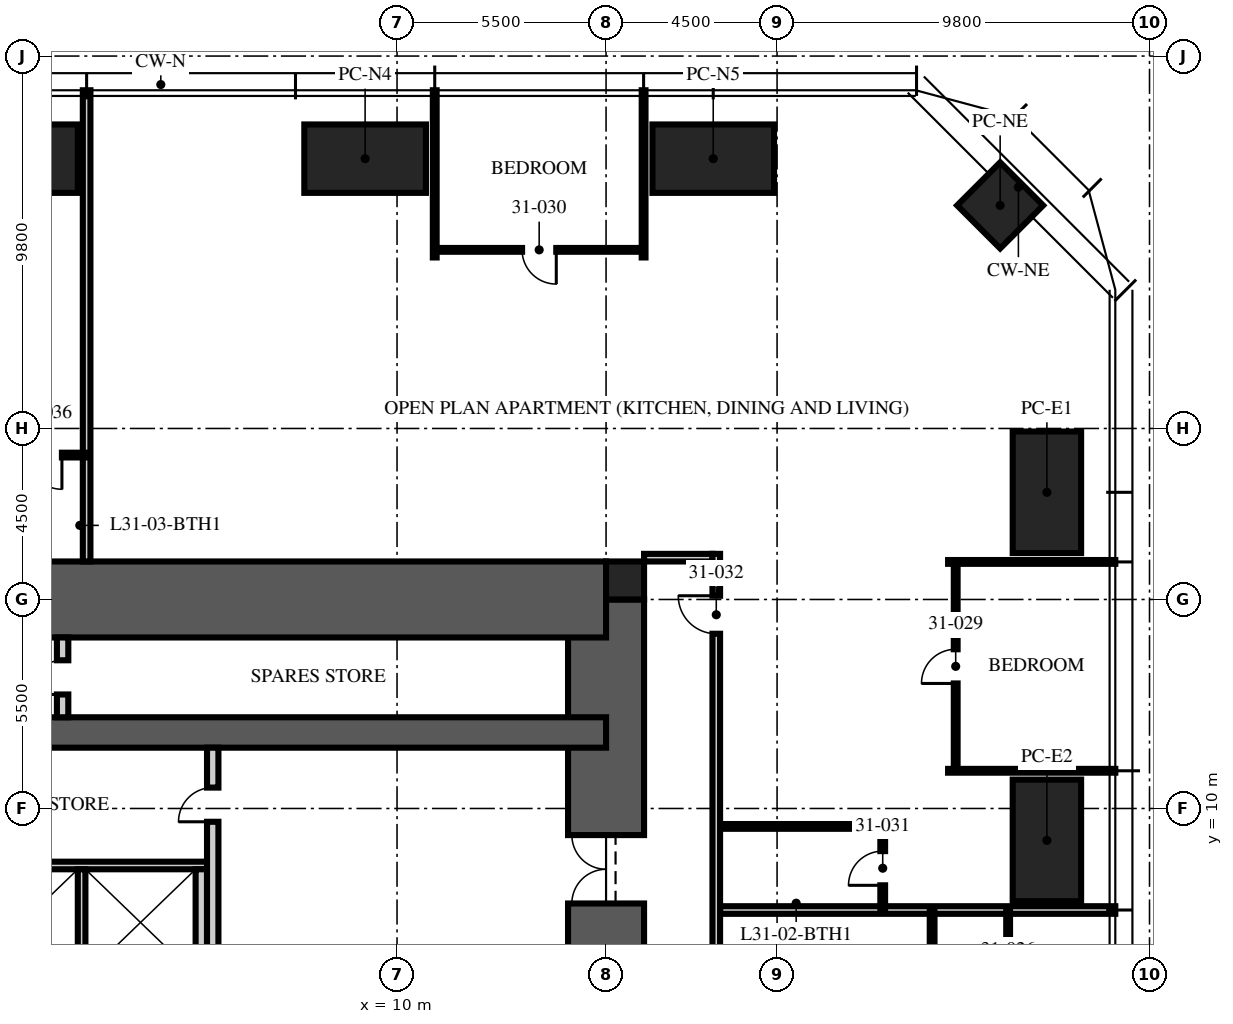
"""IFC4 building model, lengths in metres.
Left out: names, types, materials, properties, quantities, classifications, styles, units other than length and angle.
Written with IfcOpenShell. Run it as: python <this file> out.ifc"""

import sys

from ifc_helpers import new_model, si_unit, direction, frame, frame_2d, origin, origin_2d, place, context, subcontext, project, spatial, rectangle, extrude, element, fill, save


model = new_model("IFC4")
c1 = context("Model", 3, precision=1e-05, world=origin(), true_north=direction((0.0, 1.0)))
c2 = subcontext(c1, "Body", "Model", "MODEL_VIEW")
j1 = project(units=[si_unit("LENGTHUNIT", "METRE"), si_unit("PLANEANGLEUNIT", "RADIAN")], contexts=[c1])
p1 = place(None, origin())
s1 = spatial("IfcSite", under=j1, at=p1, CompositionType="ELEMENT")
p2 = place(p1, origin())
s2 = spatial("IfcBuilding", under=s1, at=p2, CompositionType="ELEMENT")
p3 = place(p2, frame((0.0, 0.0, 126.0)))
s3 = spatial("IfcBuildingStorey", under=s2, at=p3, CompositionType="ELEMENT", Elevation=126.0)
p4 = place(p3, frame((15.5, -15.5, -0.25), z_axis=(0.0, 0.0, 1.0), x_axis=(0.0, 1.0, 0.0)))
e1 = element("IfcWall", 1, at=p4, inside=s3, PredefinedType="SHEAR", context=c2, shape_type="SweptSolid", body=[
    extrude(rectangle(XDim=31.0, YDim=2.0, at=frame_2d((15.5, 0.0))), origin(), (0.0, 0.0, 1.0), 3.75),
])
p5 = place(p4, frame((6.5, 0.0, 0.25)))
e2 = element("IfcOpeningElement", 2, at=p5, cuts=e1, PredefinedType="OPENING", context=c2, shape_type="SweptSolid", body=[
    extrude(rectangle(XDim=1.2, YDim=2.1, at=frame_2d((0.6, 1.05))), frame((0.0, 1.01, 0.0), z_axis=(0.0, -1.0, 0.0), x_axis=(1.0, 0.0, 0.0)), (0.0, 0.0, 1.0), 2.02),
])
p6 = place(p4, frame((23.0, 0.0, 0.25)))
e3 = element("IfcOpeningElement", 3, at=p6, cuts=e1, PredefinedType="OPENING", context=c2, shape_type="SweptSolid", body=[
    extrude(rectangle(XDim=1.8, YDim=2.1, at=frame_2d((0.9, 1.05))), frame((0.0, 1.01, 0.0), z_axis=(0.0, -1.0, 0.0), x_axis=(1.0, 0.0, 0.0)), (0.0, 0.0, 1.0), 2.02),
])
p7 = place(p3, frame((-15.5, 15.5, -0.25), z_axis=(0.0, 0.0, 1.0), x_axis=(1.0, 0.0, 0.0)))
e4 = element("IfcWall", 4, at=p7, inside=s3, PredefinedType="SHEAR", context=c2, shape_type="SweptSolid", body=[
    extrude(rectangle(XDim=31.0, YDim=2.0, at=frame_2d((15.5, 0.0))), origin(), (0.0, 0.0, 1.0), 3.75),
])
p8 = place(p7, frame((5.0, 0.0, 0.25)))
e5 = element("IfcOpeningElement", 5, at=p8, cuts=e4, PredefinedType="OPENING", context=c2, shape_type="SweptSolid", body=[
    extrude(rectangle(XDim=1.0, YDim=2.1, at=frame_2d((0.5, 1.05))), frame((0.0, 1.01, 0.0), z_axis=(0.0, -1.0, 0.0), x_axis=(1.0, 0.0, 0.0)), (0.0, 0.0, 1.0), 2.02),
])
p9 = place(p3, frame((-15.5, 12.0, -0.25), z_axis=(0.0, 0.0, 1.0), x_axis=(1.0, 0.0, 0.0)))
e6 = element("IfcWall", 6, at=p9, inside=s3, PredefinedType="SHEAR", context=c2, shape_type="SweptSolid", body=[
    extrude(rectangle(XDim=31.0, YDim=0.8, at=frame_2d((15.5, 0.0))), origin(), (0.0, 0.0, 1.0), 3.75),
])
p10 = place(p3, frame((16.0, 16.0, -0.25), z_axis=(0.0, 0.0, 1.0), x_axis=(1.0, 0.0, 0.0)))
e7 = element("IfcColumn", 7, at=p10, inside=s3, PredefinedType="COLUMN", context=c2, shape_type="SweptSolid", body=[
    extrude(rectangle(XDim=1.0, YDim=1.0, at=origin_2d()), origin(), (0.0, 0.0, 1.0), 3.75),
])
for number, where, z_axis, x_axis in (
    (8, (0.0, 27.1, 0.0), (0.0, 0.0, 1.0), (1.0, 0.0, 0.0)),
    (9, (9.16, 27.1, 0.0), (0.0, 0.0, 1.0), (1.0, 0.0, 0.0)),
    (10, (18.32, 27.1, 0.0), (0.0, 0.0, 1.0), (1.0, 0.0, 0.0)),
    (11, (27.1, 18.32, 0.0), (0.0, 0.0, 1.0), (0.0, 1.0, 0.0)),
    (12, (27.1, 9.16, 0.0), (0.0, 0.0, 1.0), (0.0, 1.0, 0.0)),
):
    element("IfcColumn", number, at=place(p3, frame(where, z_axis=z_axis, x_axis=x_axis)), inside=s3, PredefinedType="COLUMN", context=c2, shape_type="SweptSolid", body=[
        extrude(rectangle(XDim=3.2, YDim=1.8, at=origin_2d()), origin(), (0.0, 0.0, 1.0), 3.75),
    ])
p11 = place(p3, frame((25.87, 25.87, 0.0), z_axis=(0.0, 0.0, 1.0), x_axis=(0.707106781187, -0.707106781187, 0.0)))
e13 = element("IfcColumn", 13, at=p11, inside=s3, PredefinedType="COLUMN", context=c2, shape_type="SweptSolid", body=[
    extrude(rectangle(XDim=1.6, YDim=1.6, at=origin_2d()), origin(), (0.0, 0.0, 1.0), 3.75),
])
p12 = place(p3, frame((-4.7, 8.5, 0.0), z_axis=(0.0, 0.0, 1.0), x_axis=(1.0, 0.0, 0.0)))
e14 = element("IfcWall", 14, at=p12, inside=s3, PredefinedType="PARTITIONING", context=c2, shape_type="SweptSolid", body=[
    extrude(rectangle(XDim=9.7, YDim=0.2, at=frame_2d((4.85, 0.0))), origin(), (0.0, 0.0, 1.0), 3.5),
])
p13 = place(p3, frame((4.85, 5.6, 0.0), z_axis=(0.0, 0.0, 1.0), x_axis=(0.0, 1.0, 0.0)))
e15 = element("IfcWall", 15, at=p13, inside=s3, PredefinedType="PARTITIONING", context=c2, shape_type="SweptSolid", body=[
    extrude(rectangle(XDim=2.8, YDim=0.3, at=frame_2d((1.4, 0.0))), origin(), (0.0, 0.0, 1.0), 3.5),
])
p14 = place(p3, frame((1.7, 5.6, 0.0), z_axis=(0.0, 0.0, 1.0), x_axis=(0.0, 1.0, 0.0)))
e16 = element("IfcWall", 16, at=p14, inside=s3, PredefinedType="PARTITIONING", context=c2, shape_type="SweptSolid", body=[
    extrude(rectangle(XDim=2.8, YDim=0.2, at=frame_2d((1.4, 0.0))), origin(), (0.0, 0.0, 1.0), 3.5),
])
p15 = place(p3, frame((5.15, 5.3, 0.0), z_axis=(0.0, 0.0, 1.0), x_axis=(0.0, 1.0, 0.0)))
e17 = element("IfcWall", 17, at=p15, inside=s3, PredefinedType="PARTITIONING", context=c2, shape_type="SweptSolid", body=[
    extrude(rectangle(XDim=6.3, YDim=0.3, at=frame_2d((3.15, 0.0))), origin(), (0.0, 0.0, 1.0), 3.5),
])
p16 = place(p15, frame((4.35, 0.0, 0.0)))
e18 = element("IfcOpeningElement", 18, at=p16, cuts=e17, PredefinedType="OPENING", context=c2, shape_type="SweptSolid", body=[
    extrude(rectangle(XDim=0.9, YDim=2.1, at=frame_2d((0.45, 1.05))), frame((0.0, 0.16, 0.0), z_axis=(0.0, -1.0, 0.0), x_axis=(1.0, 0.0, 0.0)), (0.0, 0.0, 1.0), 0.32),
])
p17 = place(p3, frame((1.2, 12.4, 0.0), z_axis=(0.0, 0.0, 1.0), x_axis=(0.0, 1.0, 0.0)))
e19 = element("IfcWall", 19, at=p17, inside=s3, PredefinedType="PARTITIONING", context=c2, shape_type="SweptSolid", body=[
    extrude(rectangle(XDim=2.1, YDim=0.3, at=frame_2d((1.05, 0.0))), origin(), (0.0, 0.0, 1.0), 3.5),
])
p18 = place(p17, frame((0.6, 0.0, 0.0)))
e20 = element("IfcOpeningElement", 20, at=p18, cuts=e19, PredefinedType="OPENING", context=c2, shape_type="SweptSolid", body=[
    extrude(rectangle(XDim=0.9, YDim=2.1, at=frame_2d((0.45, 1.05))), frame((0.0, 0.16, 0.0), z_axis=(0.0, -1.0, 0.0), x_axis=(1.0, 0.0, 0.0)), (0.0, 0.0, 1.0), 0.32),
])
p19 = place(p3, frame((16.5, 16.6, 0.0), z_axis=(0.0, 0.0, 1.0), x_axis=(1.0, 0.0, 0.0)))
e21 = element("IfcWall", 21, at=p19, inside=s3, PredefinedType="PARTITIONING", context=c2, shape_type="SweptSolid", body=[
    extrude(rectangle(XDim=1.8, YDim=0.2, at=frame_2d((0.9, 0.0))), origin(), (0.0, 0.0, 1.0), 2.3),
])
p20 = place(p3, frame((18.5, 7.328, 0.0), z_axis=(0.0, 0.0, 1.0), x_axis=(1.0, 0.0, 0.0)))
e22 = element("IfcWall", 22, at=p20, inside=s3, PredefinedType="PARTITIONING", context=c2, shape_type="SweptSolid", body=[
    extrude(rectangle(XDim=10.4, YDim=0.2, at=frame_2d((5.2, 0.0))), origin(), (0.0, 0.0, 1.0), 2.81),
])
for number, where, z_axis, x_axis in (
    (23, (24.5, 10.992, 0.0), (0.0, 0.0, 1.0), (1.0, 0.0, 0.0)),
    (24, (24.5, 16.488, 0.0), (0.0, 0.0, 1.0), (1.0, 0.0, 0.0)),
    (25, (16.488, 24.5, 0.0), (0.0, 0.0, 1.0), (0.0, 1.0, 0.0)),
    (26, (10.992, 24.5, 0.0), (0.0, 0.0, 1.0), (0.0, 1.0, 0.0)),
):
    element("IfcWall", number, at=place(p3, frame(where, z_axis=z_axis, x_axis=x_axis)), inside=s3, PredefinedType="PARTITIONING", context=c2, shape_type="SweptSolid", body=[
        extrude(rectangle(XDim=4.4, YDim=0.1, at=frame_2d((2.2, 0.0))), origin(), (0.0, 0.0, 1.0), 2.81),
    ])
p21 = place(p3, frame((1.832, 16.5, 0.0), z_axis=(0.0, 0.0, 1.0), x_axis=(0.0, 1.0, 0.0)))
e27 = element("IfcWall", 27, at=p21, inside=s3, PredefinedType="PARTITIONING", context=c2, shape_type="SweptSolid", body=[
    extrude(rectangle(XDim=12.4, YDim=0.2, at=frame_2d((6.2, 0.0))), origin(), (0.0, 0.0, 1.0), 2.81),
])
p22 = place(p3, frame((26.08, 1.832, 0.0), z_axis=(0.0, 0.0, 1.0), x_axis=(0.0, 1.0, 0.0)))
e28 = element("IfcWall", 28, at=p22, inside=s3, PredefinedType="PARTITIONING", context=c2, shape_type="SweptSolid", body=[
    extrude(rectangle(XDim=5.496, YDim=0.1, at=frame_2d((2.748, 0.0))), origin(), (0.0, 0.0, 1.0), 2.81),
])
p23 = place(p22, frame((0.15, 0.0, 0.0)))
e29 = element("IfcOpeningElement", 29, at=p23, cuts=e28, PredefinedType="OPENING", context=c2, shape_type="SweptSolid", body=[
    extrude(rectangle(XDim=0.9, YDim=2.1, at=frame_2d((0.45, 1.05))), frame((0.0, 0.06, 0.0), z_axis=(0.0, -1.0, 0.0), x_axis=(1.0, 0.0, 0.0)), (0.0, 0.0, 1.0), 0.12),
])
p24 = place(p22, frame((2.898, 0.0, 0.0)))
e30 = element("IfcOpeningElement", 30, at=p24, cuts=e28, PredefinedType="OPENING", context=c2, shape_type="SweptSolid", body=[
    extrude(rectangle(XDim=0.9, YDim=2.1, at=frame_2d((0.45, 1.05))), frame((0.0, 0.06, 0.0), z_axis=(0.0, -1.0, 0.0), x_axis=(1.0, 0.0, 0.0)), (0.0, 0.0, 1.0), 0.12),
])
p25 = place(p3, frame((24.08, 3.032, 0.0), z_axis=(0.0, 0.0, 1.0), x_axis=(0.0, 1.0, 0.0)))
e31 = element("IfcWall", 31, at=p25, inside=s3, PredefinedType="PARTITIONING", context=c2, shape_type="SweptSolid", body=[
    extrude(rectangle(XDim=4.296, YDim=0.125, at=frame_2d((2.148, 0.0))), origin(), (0.0, 0.0, 1.0), 2.81),
])
p26 = place(p3, frame((24.7, 10.992, 0.0), z_axis=(0.0, 0.0, 1.0), x_axis=(0.0, 1.0, 0.0)))
e32 = element("IfcWall", 32, at=p26, inside=s3, PredefinedType="PARTITIONING", context=c2, shape_type="SweptSolid", body=[
    extrude(rectangle(XDim=5.496, YDim=0.1, at=frame_2d((2.748, 0.0))), origin(), (0.0, 0.0, 1.0), 2.81),
])
p27 = place(p26, frame((2.298, 0.0, 0.0)))
e33 = element("IfcOpeningElement", 33, at=p27, cuts=e32, PredefinedType="OPENING", context=c2, shape_type="SweptSolid", body=[
    extrude(rectangle(XDim=0.9, YDim=2.1, at=frame_2d((0.45, 1.05))), frame((0.0, 0.06, 0.0), z_axis=(0.0, -1.0, 0.0), x_axis=(1.0, 0.0, 0.0)), (0.0, 0.0, 1.0), 0.12),
])
p28 = place(p3, frame((16.488, 24.7, 0.0), z_axis=(0.0, 0.0, 1.0), x_axis=(-1.0, 0.0, 0.0)))
e34 = element("IfcWall", 34, at=p28, inside=s3, PredefinedType="PARTITIONING", context=c2, shape_type="SweptSolid", body=[
    extrude(rectangle(XDim=5.496, YDim=0.1, at=frame_2d((2.748, 0.0))), origin(), (0.0, 0.0, 1.0), 2.81),
])
p29 = place(p28, frame((2.298, 0.0, 0.0)))
e35 = element("IfcOpeningElement", 35, at=p29, cuts=e34, PredefinedType="OPENING", context=c2, shape_type="SweptSolid", body=[
    extrude(rectangle(XDim=0.9, YDim=2.1, at=frame_2d((0.45, 1.05))), frame((0.0, 0.06, 0.0), z_axis=(0.0, -1.0, 0.0), x_axis=(1.0, 0.0, 0.0)), (0.0, 0.0, 1.0), 0.12),
])
p30 = place(p3, frame((22.78, 7.328, 0.0), z_axis=(0.0, 0.0, 1.0), x_axis=(0.0, 1.0, 0.0)))
e36 = element("IfcWall", 36, at=p30, inside=s3, PredefinedType="PARTITIONING", context=c2, shape_type="SweptSolid", body=[
    extrude(rectangle(XDim=2.2, YDim=0.125, at=frame_2d((1.1, 0.0))), origin(), (0.0, 0.0, 1.0), 2.7),
])
p31 = place(p30, frame((0.65, 0.0, 0.0)))
e37 = element("IfcOpeningElement", 37, at=p31, cuts=e36, PredefinedType="OPENING", context=c2, shape_type="SweptSolid", body=[
    extrude(rectangle(XDim=0.9, YDim=2.1, at=frame_2d((0.45, 1.05))), frame((0.0, 0.073, 0.0), z_axis=(0.0, -1.0, 0.0), x_axis=(1.0, 0.0, 0.0)), (0.0, 0.0, 1.0), 0.145),
])
p32 = place(p3, frame((18.5, 9.528, 0.0), z_axis=(0.0, 0.0, 1.0), x_axis=(1.0, 0.0, 0.0)))
e38 = element("IfcWall", 38, at=p32, inside=s3, PredefinedType="PARTITIONING", context=c2, shape_type="SweptSolid", body=[
    extrude(rectangle(XDim=4.28, YDim=0.125, at=frame_2d((2.14, 0.0))), origin(), (0.0, 0.0, 1.0), 3.5),
])
p33 = place(p3, frame((1.832, 19.3, 0.0), z_axis=(0.0, 0.0, 1.0), x_axis=(-1.0, 0.0, 0.0)))
e39 = element("IfcWall", 39, at=p33, inside=s3, PredefinedType="PARTITIONING", context=c2, shape_type="SweptSolid", body=[
    extrude(rectangle(XDim=2.2, YDim=0.125, at=frame_2d((1.1, 0.0))), origin(), (0.0, 0.0, 1.0), 2.7),
])
p34 = place(p33, frame((0.65, 0.0, 0.0)))
e40 = element("IfcOpeningElement", 40, at=p34, cuts=e39, PredefinedType="OPENING", context=c2, shape_type="SweptSolid", body=[
    extrude(rectangle(XDim=0.9, YDim=2.1, at=frame_2d((0.45, 1.05))), frame((0.0, 0.073, 0.0), z_axis=(0.0, -1.0, 0.0), x_axis=(1.0, 0.0, 0.0)), (0.0, 0.0, 1.0), 0.145),
])
p35 = place(p3, frame((18.4, -5.328, 0.0), z_axis=(0.0, 0.0, 1.0), x_axis=(0.0, 1.0, 0.0)))
e41 = element("IfcWall", 41, at=p35, inside=s3, PredefinedType="PARTITIONING", context=c2, shape_type="SweptSolid", body=[
    extrude(rectangle(XDim=22.028, YDim=0.2, at=frame_2d((11.014, 0.0))), origin(), (0.0, 0.0, 1.0), 2.7),
])
p36 = place(p35, frame((19.926, 0.0, 0.0)))
e42 = element("IfcOpeningElement", 42, at=p36, cuts=e41, PredefinedType="OPENING", context=c2, shape_type="SweptSolid", body=[
    extrude(rectangle(XDim=1.0, YDim=2.2, at=frame_2d((0.5, 1.1))), frame((0.0, 0.11, 0.0), z_axis=(0.0, -1.0, 0.0), x_axis=(1.0, 0.0, 0.0)), (0.0, 0.0, 1.0), 0.22),
])
p37 = place(p6, origin())
e43 = element("IfcDoor", 43, at=p37, inside=s3, OperationType="DOUBLE_DOOR_SINGLE_SWING", PredefinedType="DOOR", context=c2, shape_type="SweptSolid", body=[
    extrude(rectangle(XDim=1.8, YDim=2.1, at=frame_2d((0.9, 1.05))), frame((0.0, 0.025, 0.0), z_axis=(0.0, -1.0, 0.0), x_axis=(1.0, 0.0, 0.0)), (0.0, 0.0, 1.0), 0.05),
])
fill(e3, e43)
p38 = place(p16, origin())
e44 = element("IfcDoor", 44, at=p38, inside=s3, OperationType="SINGLE_SWING_LEFT", PredefinedType="DOOR", context=c2, shape_type="SweptSolid", body=[
    extrude(rectangle(XDim=0.9, YDim=2.1, at=frame_2d((0.45, 1.05))), frame((0.0, 0.025, 0.0), z_axis=(0.0, -1.0, 0.0), x_axis=(1.0, 0.0, 0.0)), (0.0, 0.0, 1.0), 0.05),
])
fill(e18, e44)
p39 = place(p18, origin())
e45 = element("IfcDoor", 45, at=p39, inside=s3, OperationType="SINGLE_SWING_LEFT", PredefinedType="DOOR", context=c2, shape_type="SweptSolid", body=[
    extrude(rectangle(XDim=0.9, YDim=2.1, at=frame_2d((0.45, 1.05))), frame((0.0, 0.025, 0.0), z_axis=(0.0, -1.0, 0.0), x_axis=(1.0, 0.0, 0.0)), (0.0, 0.0, 1.0), 0.05),
])
fill(e20, e45)
p40 = place(p27, origin())
e46 = element("IfcDoor", 46, at=p40, inside=s3, OperationType="SINGLE_SWING_LEFT", PredefinedType="DOOR", context=c2, shape_type="SweptSolid", body=[
    extrude(rectangle(XDim=0.9, YDim=2.1, at=frame_2d((0.45, 1.05))), frame((0.0, 0.025, 0.0), z_axis=(0.0, -1.0, 0.0), x_axis=(1.0, 0.0, 0.0)), (0.0, 0.0, 1.0), 0.05),
])
fill(e33, e46)
p41 = place(p29, origin())
e47 = element("IfcDoor", 47, at=p41, inside=s3, OperationType="SINGLE_SWING_LEFT", PredefinedType="DOOR", context=c2, shape_type="SweptSolid", body=[
    extrude(rectangle(XDim=0.9, YDim=2.1, at=frame_2d((0.45, 1.05))), frame((0.0, 0.025, 0.0), z_axis=(0.0, -1.0, 0.0), x_axis=(1.0, 0.0, 0.0)), (0.0, 0.0, 1.0), 0.05),
])
fill(e35, e47)
p42 = place(p31, origin())
e48 = element("IfcDoor", 48, at=p42, inside=s3, OperationType="SINGLE_SWING_LEFT", PredefinedType="DOOR", context=c2, shape_type="SweptSolid", body=[
    extrude(rectangle(XDim=0.9, YDim=2.1, at=frame_2d((0.45, 1.05))), frame((0.0, 0.025, 0.0), z_axis=(0.0, -1.0, 0.0), x_axis=(1.0, 0.0, 0.0)), (0.0, 0.0, 1.0), 0.05),
])
fill(e37, e48)
p43 = place(p36, origin())
e49 = element("IfcDoor", 49, at=p43, inside=s3, OperationType="SINGLE_SWING_RIGHT", PredefinedType="DOOR", context=c2, shape_type="SweptSolid", body=[
    extrude(rectangle(XDim=1.0, YDim=2.2, at=frame_2d((0.5, 1.1))), frame((0.0, 0.025, 0.0), z_axis=(0.0, -1.0, 0.0), x_axis=(1.0, 0.0, 0.0)), (0.0, 0.0, 1.0), 0.05),
])
fill(e42, e49)
p44 = place(p34, origin())
e50 = element("IfcDoor", 50, at=p44, inside=s3, OperationType="SINGLE_SWING_LEFT", PredefinedType="DOOR", context=c2, shape_type="SweptSolid", body=[
    extrude(rectangle(XDim=0.9, YDim=2.1, at=frame_2d((0.45, 1.05))), frame((0.0, 0.025, 0.0), z_axis=(0.0, -1.0, 0.0), x_axis=(1.0, 0.0, 0.0)), (0.0, 0.0, 1.0), 0.05),
])
fill(e40, e50)
save(model, sys.argv[1])
